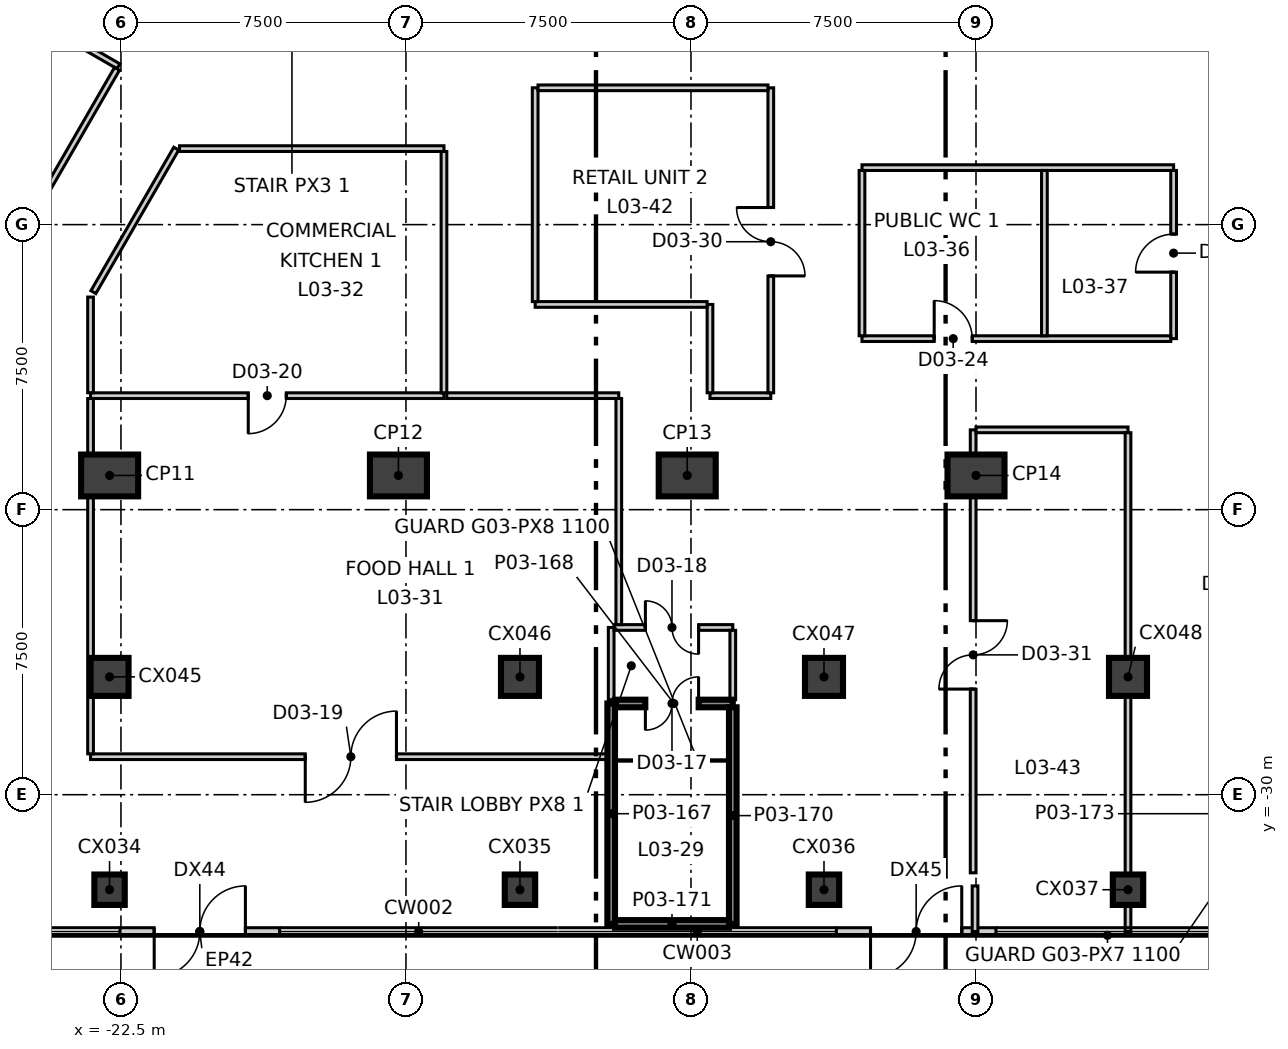
"""IFC4 building model, lengths in metres.
Left out: names, types, materials, properties, quantities, classifications, styles, units other than length and angle.
Written with IfcOpenShell. Run it as: python <this file> out.ifc"""

import sys

from ifc_helpers import new_model, si_unit, direction, frame, frame_2d, origin, origin_2d, place, context, subcontext, project, spatial, rectangle, extrude, element, fill, save


model = new_model("IFC4")
c1 = context("Model", 3, precision=1e-05, world=origin(), true_north=direction((0.0, 1.0)))
c2 = subcontext(c1, "Body", "Model", "MODEL_VIEW")
j1 = project(units=[si_unit("LENGTHUNIT", "METRE"), si_unit("PLANEANGLEUNIT", "RADIAN")], contexts=[c1])
p1 = place(None, origin())
s1 = spatial("IfcSite", under=j1, at=p1, CompositionType="ELEMENT")
p2 = place(p1, origin())
s2 = spatial("IfcBuilding", under=s1, at=p2, CompositionType="ELEMENT")
p3 = place(p2, frame((0.0, 0.0, 19.9)))
s3 = spatial("IfcBuildingStorey", under=s2, at=p3, CompositionType="ELEMENT", Elevation=19.9)
for number, where, z_axis, x_axis in (
    (1, (-22.798, -21.6, -0.4), (0.0, 0.0, 1.0), (1.0, 0.0, 0.0)),
    (2, (-15.198, -21.6, -0.4), (0.0, 0.0, 1.0), (1.0, 0.0, 0.0)),
    (3, (-7.599, -21.6, -0.4), (0.0, 0.0, 1.0), (1.0, 0.0, 0.0)),
    (4, (0.0, -21.6, -0.4), (0.0, 0.0, 1.0), (1.0, 0.0, 0.0)),
):
    element("IfcColumn", number, at=place(p3, frame(where, z_axis=z_axis, x_axis=x_axis)), inside=s3, PredefinedType="COLUMN", context=c2, shape_type="SweptSolid", body=[
        extrude(rectangle(XDim=1.5, YDim=1.1, at=origin_2d()), origin(), (0.0, 0.0, 1.0), 5.4),
    ])
for number, where, z_axis, x_axis in (
    (5, (-22.8, -32.5, -0.4), (0.0, 0.0, 1.0), (1.0, 0.0, 0.0)),
    (6, (-12.0, -32.5, -0.4), (0.0, 0.0, 1.0), (1.0, 0.0, 0.0)),
    (7, (-4.0, -32.5, -0.4), (0.0, 0.0, 1.0), (1.0, 0.0, 0.0)),
    (8, (4.0, -32.5, -0.4), (0.0, 0.0, 1.0), (1.0, 0.0, 0.0)),
):
    element("IfcColumn", number, at=place(p3, frame(where, z_axis=z_axis, x_axis=x_axis)), inside=s3, PredefinedType="COLUMN", context=c2, shape_type="SweptSolid", body=[
        extrude(rectangle(XDim=0.8, YDim=0.8, at=origin_2d()), origin(), (0.0, 0.0, 1.0), 5.4),
    ])
for number, where, z_axis, x_axis in (
    (9, (-22.8, -26.9, -0.4), (0.0, 0.0, 1.0), (1.0, 0.0, 0.0)),
    (10, (-12.0, -26.9, -0.4), (0.0, 0.0, 1.0), (1.0, 0.0, 0.0)),
    (11, (-4.0, -26.9, -0.4), (0.0, 0.0, 1.0), (1.0, 0.0, 0.0)),
    (12, (4.0, -26.9, -0.4), (0.0, 0.0, 1.0), (1.0, 0.0, 0.0)),
):
    element("IfcColumn", number, at=place(p3, frame(where, z_axis=z_axis, x_axis=x_axis)), inside=s3, PredefinedType="COLUMN", context=c2, shape_type="SweptSolid", body=[
        extrude(rectangle(XDim=1.0, YDim=1.0, at=origin_2d()), origin(), (0.0, 0.0, 1.0), 5.4),
    ])
p4 = place(p3, frame((-22.525, -33.6, 0.0), z_axis=(0.0, 0.0, 1.0), x_axis=(1.0, 0.0, 0.0)))
e13 = element("IfcWall", 13, at=p4, inside=s3, PredefinedType="ELEMENTEDWALL", context=c2, shape_type="SweptSolid", body=[
    extrude(rectangle(XDim=4.2, YDim=0.2, at=frame_2d((2.1, 0.0))), origin(), (0.0, 0.0, 1.0), 5.0),
])
p5 = place(p4, frame((0.9, 0.0, 0.0)))
e14 = element("IfcOpeningElement", 14, at=p5, cuts=e13, PredefinedType="OPENING", context=c2, shape_type="SweptSolid", body=[
    extrude(rectangle(XDim=2.4, YDim=2.4, at=frame_2d((1.2, 1.2))), frame((0.0, 0.11, 0.0), z_axis=(0.0, -1.0, 0.0), x_axis=(1.0, 0.0, 0.0)), (0.0, 0.0, 1.0), 0.22),
])
p6 = place(p3, frame((-3.675, -33.6, 0.0), z_axis=(0.0, 0.0, 1.0), x_axis=(1.0, 0.0, 0.0)))
e15 = element("IfcWall", 15, at=p6, inside=s3, PredefinedType="ELEMENTEDWALL", context=c2, shape_type="SweptSolid", body=[
    extrude(rectangle(XDim=4.2, YDim=0.2, at=frame_2d((2.1, 0.0))), origin(), (0.0, 0.0, 1.0), 5.0),
])
p7 = place(p6, frame((0.9, 0.0, 0.0)))
e16 = element("IfcOpeningElement", 16, at=p7, cuts=e15, PredefinedType="OPENING", context=c2, shape_type="SweptSolid", body=[
    extrude(rectangle(XDim=2.4, YDim=2.4, at=frame_2d((1.2, 1.2))), frame((0.0, 0.11, 0.0), z_axis=(0.0, -1.0, 0.0), x_axis=(1.0, 0.0, 0.0)), (0.0, 0.0, 1.0), 0.22),
])
p8 = place(p3, frame((-23.3, -19.5, 0.0), z_axis=(0.0, 0.0, 1.0), x_axis=(1.0, 0.0, 0.0)))
e17 = element("IfcWall", 17, at=p8, inside=s3, PredefinedType="PARTITIONING", context=c2, shape_type="SweptSolid", body=[
    extrude(rectangle(XDim=9.3, YDim=0.15, at=frame_2d((4.65, 0.0))), origin(), (0.0, 0.0, 1.0), 5.0),
])
p9 = place(p8, frame((4.15, 0.0, 0.0)))
e18 = element("IfcOpeningElement", 18, at=p9, cuts=e17, PredefinedType="OPENING", context=c2, shape_type="SweptSolid", body=[
    extrude(rectangle(XDim=1.0, YDim=2.1, at=frame_2d((0.5, 1.05))), frame((0.0, 0.085, 0.0), z_axis=(0.0, -1.0, 0.0), x_axis=(1.0, 0.0, 0.0)), (0.0, 0.0, 1.0), 0.17),
])
p10 = place(p3, frame((-23.3, -19.425, 0.0), z_axis=(0.0, 0.0, 1.0), x_axis=(0.0, 1.0, 0.0)))
e19 = element("IfcWall", 19, at=p10, inside=s3, PredefinedType="PARTITIONING", context=c2, shape_type="SweptSolid", body=[
    extrude(rectangle(XDim=2.519, YDim=0.15, at=frame_2d((1.26, 0.0))), origin(), (0.0, 0.0, 1.0), 5.0),
])
p11 = place(p3, frame((-23.225, -16.777, 0.0), z_axis=(0.0, 0.0, 1.0), x_axis=(0.499908216116, 0.86607838875, 0.0)))
e20 = element("IfcWall", 20, at=p11, inside=s3, PredefinedType="PARTITIONING", context=c2, shape_type="SweptSolid", body=[
    extrude(rectangle(XDim=4.361, YDim=0.15, at=frame_2d((2.181, 0.0))), origin(), (0.0, 0.0, 1.0), 5.0),
])
p12 = place(p3, frame((-20.958, -13.0, 0.0), z_axis=(0.0, 0.0, 1.0), x_axis=(1.0, 0.0, 0.0)))
e21 = element("IfcWall", 21, at=p12, inside=s3, PredefinedType="PARTITIONING", context=c2, shape_type="SweptSolid", body=[
    extrude(rectangle(XDim=6.958, YDim=0.15, at=frame_2d((3.479, 0.0))), origin(), (0.0, 0.0, 1.0), 5.0),
])
p13 = place(p3, frame((-14.0, -19.425, 0.0), z_axis=(0.0, 0.0, 1.0), x_axis=(0.0, 1.0, 0.0)))
e22 = element("IfcWall", 22, at=p13, inside=s3, PredefinedType="PARTITIONING", context=c2, shape_type="SweptSolid", body=[
    extrude(rectangle(XDim=6.35, YDim=0.15, at=frame_2d((3.175, 0.0))), origin(), (0.0, 0.0, 1.0), 5.0),
])
p14 = place(p3, frame((-9.6, -27.5, 0.0), z_axis=(0.0, 0.0, 1.0), x_axis=(0.0, 1.0, 0.0)))
e23 = element("IfcWall", 23, at=p14, inside=s3, PredefinedType="PARTITIONING", context=c2, shape_type="SweptSolid", body=[
    extrude(rectangle(XDim=1.9, YDim=0.15, at=frame_2d((0.95, 0.0))), origin(), (0.0, 0.0, 1.0), 5.0),
])
p15 = place(p3, frame((-9.525, -25.6, 0.0), z_axis=(0.0, 0.0, 1.0), x_axis=(1.0, 0.0, 0.0)))
e24 = element("IfcWall", 24, at=p15, inside=s3, PredefinedType="PARTITIONING", context=c2, shape_type="SweptSolid", body=[
    extrude(rectangle(XDim=3.125, YDim=0.15, at=frame_2d((1.562, 0.0))), origin(), (0.0, 0.0, 1.0), 5.0),
])
p16 = place(p15, frame((0.825, 0.0, 0.0)))
e25 = element("IfcOpeningElement", 25, at=p16, cuts=e24, PredefinedType="OPENING", context=c2, shape_type="SweptSolid", body=[
    extrude(rectangle(XDim=1.4, YDim=2.1, at=frame_2d((0.7, 1.05))), frame((0.0, 0.085, 0.0), z_axis=(0.0, -1.0, 0.0), x_axis=(1.0, 0.0, 0.0)), (0.0, 0.0, 1.0), 0.17),
])
p17 = place(p3, frame((-6.4, -27.5, 0.0), z_axis=(0.0, 0.0, 1.0), x_axis=(0.0, 1.0, 0.0)))
e26 = element("IfcWall", 26, at=p17, inside=s3, PredefinedType="PARTITIONING", context=c2, shape_type="SweptSolid", body=[
    extrude(rectangle(XDim=1.825, YDim=0.15, at=frame_2d((0.913, 0.0))), origin(), (0.0, 0.0, 1.0), 5.0),
])
p18 = place(p3, frame((-23.881, -10.075, 0.0), z_axis=(0.0, 0.0, 1.0), x_axis=(0.866107952761, -0.499856993713, 0.0)))
e27 = element("IfcWall", 27, at=p18, inside=s3, PredefinedType="PARTITIONING", context=c2, shape_type="SweptSolid", body=[
    extrude(rectangle(XDim=1.519, YDim=0.15, at=frame_2d((0.759, 0.0))), origin(), (0.0, 0.0, 1.0), 5.0),
])
p19 = place(p3, frame((-25.625, -16.134, 0.0), z_axis=(0.0, 0.0, 1.0), x_axis=(0.499935724827, 0.866062509893, 0.0)))
e28 = element("IfcWall", 28, at=p19, inside=s3, PredefinedType="PARTITIONING", context=c2, shape_type="SweptSolid", body=[
    extrude(rectangle(XDim=6.045, YDim=0.15, at=frame_2d((3.022, 0.0))), origin(), (0.0, 0.0, 1.0), 5.0),
])
p20 = place(p3, frame((-23.3, -29.0, 0.0), z_axis=(0.0, 0.0, 1.0), x_axis=(1.0, 0.0, 0.0)))
e29 = element("IfcWall", 29, at=p20, inside=s3, PredefinedType="PARTITIONING", context=c2, shape_type="SweptSolid", body=[
    extrude(rectangle(XDim=13.6, YDim=0.15, at=frame_2d((6.8, 0.0))), origin(), (0.0, 0.0, 1.0), 5.0),
])
p21 = place(p20, frame((5.65, 0.0, 0.0)))
e30 = element("IfcOpeningElement", 30, at=p21, cuts=e29, PredefinedType="OPENING", context=c2, shape_type="SweptSolid", body=[
    extrude(rectangle(XDim=2.4, YDim=2.1, at=frame_2d((1.2, 1.05))), frame((0.0, 0.085, 0.0), z_axis=(0.0, -1.0, 0.0), x_axis=(1.0, 0.0, 0.0)), (0.0, 0.0, 1.0), 0.17),
])
p22 = place(p3, frame((-23.3, -28.925, 0.0), z_axis=(0.0, 0.0, 1.0), x_axis=(0.0, 1.0, 0.0)))
e31 = element("IfcWall", 31, at=p22, inside=s3, PredefinedType="PARTITIONING", context=c2, shape_type="SweptSolid", body=[
    extrude(rectangle(XDim=9.35, YDim=0.15, at=frame_2d((4.675, 0.0))), origin(), (0.0, 0.0, 1.0), 5.0),
])
p23 = place(p3, frame((-13.927, -19.5, 0.0), z_axis=(0.0, 0.0, 1.0), x_axis=(1.0, 0.0, 0.0)))
e32 = element("IfcWall", 32, at=p23, inside=s3, PredefinedType="PARTITIONING", context=c2, shape_type="SweptSolid", body=[
    extrude(rectangle(XDim=4.527, YDim=0.15, at=frame_2d((2.264, 0.0))), origin(), (0.0, 0.0, 1.0), 5.0),
])
p24 = place(p3, frame((-7.0, -19.5, 0.0), z_axis=(0.0, 0.0, 1.0), x_axis=(1.0, 0.0, 0.0)))
e33 = element("IfcWall", 33, at=p24, inside=s3, PredefinedType="PARTITIONING", context=c2, shape_type="SweptSolid", body=[
    extrude(rectangle(XDim=1.6, YDim=0.15, at=frame_2d((0.8, 0.0))), origin(), (0.0, 0.0, 1.0), 5.0),
])
p25 = place(p3, frame((-9.4, -25.525, 0.0), z_axis=(0.0, 0.0, 1.0), x_axis=(0.0, 1.0, 0.0)))
e34 = element("IfcWall", 34, at=p25, inside=s3, PredefinedType="PARTITIONING", context=c2, shape_type="SweptSolid", body=[
    extrude(rectangle(XDim=5.95, YDim=0.15, at=frame_2d((2.975, 0.0))), origin(), (0.0, 0.0, 1.0), 5.0),
])
p26 = place(p3, frame((-0.025, -33.6, 0.0), z_axis=(0.0, 0.0, 1.0), x_axis=(0.0, 1.0, 0.0)))
e35 = element("IfcWall", 35, at=p26, inside=s3, PredefinedType="PARTITIONING", context=c2, shape_type="SweptSolid", body=[
    extrude(rectangle(XDim=1.2, YDim=0.15, at=frame_2d((0.6, 0.0))), origin(), (0.0, 0.0, 1.0), 5.0),
])
p27 = place(p3, frame((-0.075, -32.056, 0.0), z_axis=(0.0, 0.0, 1.0), x_axis=(0.0, 1.0, 0.0)))
e36 = element("IfcWall", 36, at=p27, inside=s3, PredefinedType="PARTITIONING", context=c2, shape_type="SweptSolid", body=[
    extrude(rectangle(XDim=11.656, YDim=0.15, at=frame_2d((5.828, 0.0))), origin(), (0.0, 0.0, 1.0), 4.5),
])
p28 = place(p27, frame((4.835, 0.0, 0.0)))
e37 = element("IfcOpeningElement", 37, at=p28, cuts=e36, PredefinedType="OPENING", context=c2, shape_type="SweptSolid", body=[
    extrude(rectangle(XDim=1.8, YDim=2.1, at=frame_2d((0.9, 1.05))), frame((0.0, 0.085, 0.0), z_axis=(0.0, -1.0, 0.0), x_axis=(1.0, 0.0, 0.0)), (0.0, 0.0, 1.0), 0.17),
])
p29 = place(p3, frame((0.0, -20.4, 0.0), z_axis=(0.0, 0.0, 1.0), x_axis=(1.0, 0.0, 0.0)))
e38 = element("IfcWall", 38, at=p29, inside=s3, PredefinedType="PARTITIONING", context=c2, shape_type="SweptSolid", body=[
    extrude(rectangle(XDim=4.0, YDim=0.15, at=frame_2d((2.0, 0.0))), origin(), (0.0, 0.0, 1.0), 5.0),
])
p30 = place(p3, frame((4.0, -33.6, 0.0), z_axis=(0.0, 0.0, 1.0), x_axis=(0.0, 1.0, 0.0)))
e39 = element("IfcWall", 39, at=p30, inside=s3, PredefinedType="PARTITIONING", context=c2, shape_type="SweptSolid", body=[
    extrude(rectangle(XDim=13.125, YDim=0.15, at=frame_2d((6.562, 0.0))), origin(), (0.0, 0.0, 1.0), 4.3),
])
p31 = place(p3, frame((-3.0, -13.5, 0.0), z_axis=(0.0, 0.0, 1.0), x_axis=(1.0, 0.0, 0.0)))
e40 = element("IfcWall", 40, at=p31, inside=s3, PredefinedType="PARTITIONING", context=c2, shape_type="SweptSolid", body=[
    extrude(rectangle(XDim=8.2, YDim=0.15, at=frame_2d((4.1, 0.0))), origin(), (0.0, 0.0, 1.0), 5.0),
])
p32 = place(p3, frame((5.2, -18.0, 0.0), z_axis=(0.0, 0.0, 1.0), x_axis=(0.0, 1.0, 0.0)))
e41 = element("IfcWall", 41, at=p32, inside=s3, PredefinedType="PARTITIONING", context=c2, shape_type="SweptSolid", body=[
    extrude(rectangle(XDim=4.425, YDim=0.15, at=frame_2d((2.212, 0.0))), origin(), (0.0, 0.0, 1.0), 5.0),
])
p33 = place(p32, frame((1.75, 0.0, 0.0)))
e42 = element("IfcOpeningElement", 42, at=p33, cuts=e41, PredefinedType="OPENING", context=c2, shape_type="SweptSolid", body=[
    extrude(rectangle(XDim=1.0, YDim=2.1, at=frame_2d((0.5, 1.05))), frame((0.0, 0.085, 0.0), z_axis=(0.0, -1.0, 0.0), x_axis=(1.0, 0.0, 0.0)), (0.0, 0.0, 1.0), 0.17),
])
p34 = place(p3, frame((-3.0, -18.0, 0.0), z_axis=(0.0, 0.0, 1.0), x_axis=(1.0, 0.0, 0.0)))
e43 = element("IfcWall", 43, at=p34, inside=s3, PredefinedType="PARTITIONING", context=c2, shape_type="SweptSolid", body=[
    extrude(rectangle(XDim=8.125, YDim=0.15, at=frame_2d((4.062, 0.0))), origin(), (0.0, 0.0, 1.0), 5.0),
])
p35 = place(p34, frame((1.9, 0.0, 0.0)))
e44 = element("IfcOpeningElement", 44, at=p35, cuts=e43, PredefinedType="OPENING", context=c2, shape_type="SweptSolid", body=[
    extrude(rectangle(XDim=1.0, YDim=2.1, at=frame_2d((0.5, 1.05))), frame((0.0, 0.085, 0.0), z_axis=(0.0, -1.0, 0.0), x_axis=(1.0, 0.0, 0.0)), (0.0, 0.0, 1.0), 0.17),
])
for number, where, z_axis, x_axis in (
    (45, (1.8, -17.925, 0.0), (0.0, 0.0, 1.0), (0.0, 1.0, 0.0)),
    (46, (-3.0, -17.925, 0.0), (0.0, 0.0, 1.0), (0.0, 1.0, 0.0)),
):
    element("IfcWall", number, at=place(p3, frame(where, z_axis=z_axis, x_axis=x_axis)), inside=s3, PredefinedType="PARTITIONING", context=c2, shape_type="SweptSolid", body=[
        extrude(rectangle(XDim=4.35, YDim=0.15, at=frame_2d((2.175, 0.0))), origin(), (0.0, 0.0, 1.0), 5.0),
    ])
p36 = place(p3, frame((-5.4, -19.425, 0.0), z_axis=(0.0, 0.0, 1.0), x_axis=(0.0, 1.0, 0.0)))
e47 = element("IfcWall", 47, at=p36, inside=s3, PredefinedType="PARTITIONING", context=c2, shape_type="SweptSolid", body=[
    extrude(rectangle(XDim=8.025, YDim=0.15, at=frame_2d((4.013, 0.0))), origin(), (0.0, 0.0, 1.0), 5.0),
])
p37 = place(p36, frame((3.075, 0.0, 0.0)))
e48 = element("IfcOpeningElement", 48, at=p37, cuts=e47, PredefinedType="OPENING", context=c2, shape_type="SweptSolid", body=[
    extrude(rectangle(XDim=1.8, YDim=2.1, at=frame_2d((0.9, 1.05))), frame((0.0, 0.085, 0.0), z_axis=(0.0, -1.0, 0.0), x_axis=(1.0, 0.0, 0.0)), (0.0, 0.0, 1.0), 0.17),
])
p38 = place(p3, frame((-7.0, -19.425, 0.0), z_axis=(0.0, 0.0, 1.0), x_axis=(0.0, 1.0, 0.0)))
e49 = element("IfcWall", 49, at=p38, inside=s3, PredefinedType="PARTITIONING", context=c2, shape_type="SweptSolid", body=[
    extrude(rectangle(XDim=2.325, YDim=0.15, at=frame_2d((1.163, 0.0))), origin(), (0.0, 0.0, 1.0), 5.0),
])
p39 = place(p3, frame((-11.6, -17.1, 0.0), z_axis=(0.0, 0.0, 1.0), x_axis=(1.0, 0.0, 0.0)))
e50 = element("IfcWall", 50, at=p39, inside=s3, PredefinedType="PARTITIONING", context=c2, shape_type="SweptSolid", body=[
    extrude(rectangle(XDim=4.525, YDim=0.15, at=frame_2d((2.263, 0.0))), origin(), (0.0, 0.0, 1.0), 5.0),
])
p40 = place(p3, frame((-11.6, -17.025, 0.0), z_axis=(0.0, 0.0, 1.0), x_axis=(0.0, 1.0, 0.0)))
e51 = element("IfcWall", 51, at=p40, inside=s3, PredefinedType="PARTITIONING", context=c2, shape_type="SweptSolid", body=[
    extrude(rectangle(XDim=5.625, YDim=0.15, at=frame_2d((2.812, 0.0))), origin(), (0.0, 0.0, 1.0), 5.0),
])
p41 = place(p3, frame((-11.525, -11.4, 0.0), z_axis=(0.0, 0.0, 1.0), x_axis=(1.0, 0.0, 0.0)))
e52 = element("IfcWall", 52, at=p41, inside=s3, PredefinedType="PARTITIONING", context=c2, shape_type="SweptSolid", body=[
    extrude(rectangle(XDim=6.05, YDim=0.15, at=frame_2d((3.025, 0.0))), origin(), (0.0, 0.0, 1.0), 5.0),
])
p42 = place(p3, frame((-9.6, -33.4, 0.0), z_axis=(0.0, 0.0, 1.0), x_axis=(0.0, 1.0, 0.0)))
e53 = element("IfcWall", 53, at=p42, inside=s3, PredefinedType="SOLIDWALL", context=c2, shape_type="SweptSolid", body=[
    extrude(rectangle(XDim=5.8, YDim=0.2, at=frame_2d((2.9, 0.0))), origin(), (0.0, 0.0, 1.0), 5.0),
])
p43 = place(p3, frame((-9.5, -27.6, 0.0), z_axis=(0.0, 0.0, 1.0), x_axis=(1.0, 0.0, 0.0)))
e54 = element("IfcWall", 54, at=p43, inside=s3, PredefinedType="SOLIDWALL", context=c2, shape_type="SweptSolid", body=[
    extrude(rectangle(XDim=3.1, YDim=0.2, at=frame_2d((1.55, 0.0))), origin(), (0.0, 0.0, 1.0), 5.0),
])
p44 = place(p43, frame((0.8, 0.0, 0.0)))
e55 = element("IfcOpeningElement", 55, at=p44, cuts=e54, PredefinedType="OPENING", context=c2, shape_type="SweptSolid", body=[
    extrude(rectangle(XDim=1.4, YDim=2.1, at=frame_2d((0.7, 1.05))), frame((0.0, 0.11, 0.0), z_axis=(0.0, -1.0, 0.0), x_axis=(1.0, 0.0, 0.0)), (0.0, 0.0, 1.0), 0.22),
])
p45 = place(p3, frame((-6.4, -33.4, 0.0), z_axis=(0.0, 0.0, 1.0), x_axis=(0.0, 1.0, 0.0)))
e56 = element("IfcWall", 56, at=p45, inside=s3, PredefinedType="SOLIDWALL", context=c2, shape_type="SweptSolid", body=[
    extrude(rectangle(XDim=5.7, YDim=0.2, at=frame_2d((2.85, 0.0))), origin(), (0.0, 0.0, 1.0), 5.0),
])
p46 = place(p3, frame((-9.5, -33.4, 0.0), z_axis=(0.0, 0.0, 1.0), x_axis=(1.0, 0.0, 0.0)))
e57 = element("IfcWall", 57, at=p46, inside=s3, PredefinedType="SOLIDWALL", context=c2, shape_type="SweptSolid", body=[
    extrude(rectangle(XDim=3.0, YDim=0.2, at=frame_2d((1.5, 0.0))), origin(), (0.0, 0.0, 1.0), 5.0),
])
p47 = place(p5, frame((2.4, 0.0, 0.0), z_axis=(0.0, 0.0, 1.0), x_axis=(-1.0, 0.0, 0.0)))
e58 = element("IfcDoor", 58, at=p47, inside=s3, OperationType="DOUBLE_DOOR_SINGLE_SWING", PredefinedType="DOOR", context=c2, shape_type="SweptSolid", body=[
    extrude(rectangle(XDim=2.4, YDim=2.4, at=frame_2d((1.2, 1.2))), frame((0.0, 0.025, 0.0), z_axis=(0.0, -1.0, 0.0), x_axis=(1.0, 0.0, 0.0)), (0.0, 0.0, 1.0), 0.05),
])
fill(e14, e58)
p48 = place(p7, frame((2.4, 0.0, 0.0), z_axis=(0.0, 0.0, 1.0), x_axis=(-1.0, 0.0, 0.0)))
e59 = element("IfcDoor", 59, at=p48, inside=s3, OperationType="DOUBLE_DOOR_SINGLE_SWING", PredefinedType="DOOR", context=c2, shape_type="SweptSolid", body=[
    extrude(rectangle(XDim=2.4, YDim=2.4, at=frame_2d((1.2, 1.2))), frame((0.0, 0.025, 0.0), z_axis=(0.0, -1.0, 0.0), x_axis=(1.0, 0.0, 0.0)), (0.0, 0.0, 1.0), 0.05),
])
fill(e16, e59)
p49 = place(p44, origin())
e60 = element("IfcDoor", 60, at=p49, inside=s3, OperationType="DOUBLE_DOOR_SINGLE_SWING", PredefinedType="DOOR", context=c2, shape_type="SweptSolid", body=[
    extrude(rectangle(XDim=1.4, YDim=2.1, at=frame_2d((0.7, 1.05))), frame((0.0, 0.025, 0.0), z_axis=(0.0, -1.0, 0.0), x_axis=(1.0, 0.0, 0.0)), (0.0, 0.0, 1.0), 0.05),
])
fill(e55, e60)
p50 = place(p16, origin())
e61 = element("IfcDoor", 61, at=p50, inside=s3, OperationType="DOUBLE_DOOR_SINGLE_SWING", PredefinedType="DOOR", context=c2, shape_type="SweptSolid", body=[
    extrude(rectangle(XDim=1.4, YDim=2.1, at=frame_2d((0.7, 1.05))), frame((0.0, 0.025, 0.0), z_axis=(0.0, -1.0, 0.0), x_axis=(1.0, 0.0, 0.0)), (0.0, 0.0, 1.0), 0.05),
])
fill(e25, e61)
p51 = place(p21, origin())
e62 = element("IfcDoor", 62, at=p51, inside=s3, OperationType="DOUBLE_DOOR_SINGLE_SWING", PredefinedType="DOOR", context=c2, shape_type="SweptSolid", body=[
    extrude(rectangle(XDim=2.4, YDim=2.1, at=frame_2d((1.2, 1.05))), frame((0.0, 0.025, 0.0), z_axis=(0.0, -1.0, 0.0), x_axis=(1.0, 0.0, 0.0)), (0.0, 0.0, 1.0), 0.05),
])
fill(e30, e62)
p52 = place(p9, origin())
e63 = element("IfcDoor", 63, at=p52, inside=s3, OperationType="SINGLE_SWING_LEFT", PredefinedType="DOOR", context=c2, shape_type="SweptSolid", body=[
    extrude(rectangle(XDim=1.0, YDim=2.1, at=frame_2d((0.5, 1.05))), frame((0.0, 0.025, 0.0), z_axis=(0.0, -1.0, 0.0), x_axis=(1.0, 0.0, 0.0)), (0.0, 0.0, 1.0), 0.05),
])
fill(e18, e63)
p53 = place(p35, origin())
e64 = element("IfcDoor", 64, at=p53, inside=s3, OperationType="SINGLE_SWING_RIGHT", PredefinedType="DOOR", context=c2, shape_type="SweptSolid", body=[
    extrude(rectangle(XDim=1.0, YDim=2.1, at=frame_2d((0.5, 1.05))), frame((0.0, 0.025, 0.0), z_axis=(0.0, -1.0, 0.0), x_axis=(1.0, 0.0, 0.0)), (0.0, 0.0, 1.0), 0.05),
])
fill(e44, e64)
p54 = place(p33, origin())
e65 = element("IfcDoor", 65, at=p54, inside=s3, OperationType="SINGLE_SWING_RIGHT", PredefinedType="DOOR", context=c2, shape_type="SweptSolid", body=[
    extrude(rectangle(XDim=1.0, YDim=2.1, at=frame_2d((0.5, 1.05))), frame((0.0, 0.025, 0.0), z_axis=(0.0, -1.0, 0.0), x_axis=(1.0, 0.0, 0.0)), (0.0, 0.0, 1.0), 0.05),
])
fill(e42, e65)
p55 = place(p37, origin())
e66 = element("IfcDoor", 66, at=p55, inside=s3, OperationType="DOUBLE_DOOR_SINGLE_SWING", PredefinedType="DOOR", context=c2, shape_type="SweptSolid", body=[
    extrude(rectangle(XDim=1.8, YDim=2.1, at=frame_2d((0.9, 1.05))), frame((0.0, 0.025, 0.0), z_axis=(0.0, -1.0, 0.0), x_axis=(1.0, 0.0, 0.0)), (0.0, 0.0, 1.0), 0.05),
])
fill(e48, e66)
p56 = place(p28, origin())
e67 = element("IfcDoor", 67, at=p56, inside=s3, OperationType="DOUBLE_DOOR_SINGLE_SWING", PredefinedType="DOOR", context=c2, shape_type="SweptSolid", body=[
    extrude(rectangle(XDim=1.8, YDim=2.1, at=frame_2d((0.9, 1.05))), frame((0.0, 0.025, 0.0), z_axis=(0.0, -1.0, 0.0), x_axis=(1.0, 0.0, 0.0)), (0.0, 0.0, 1.0), 0.05),
])
fill(e37, e67)
save(model, sys.argv[1])
